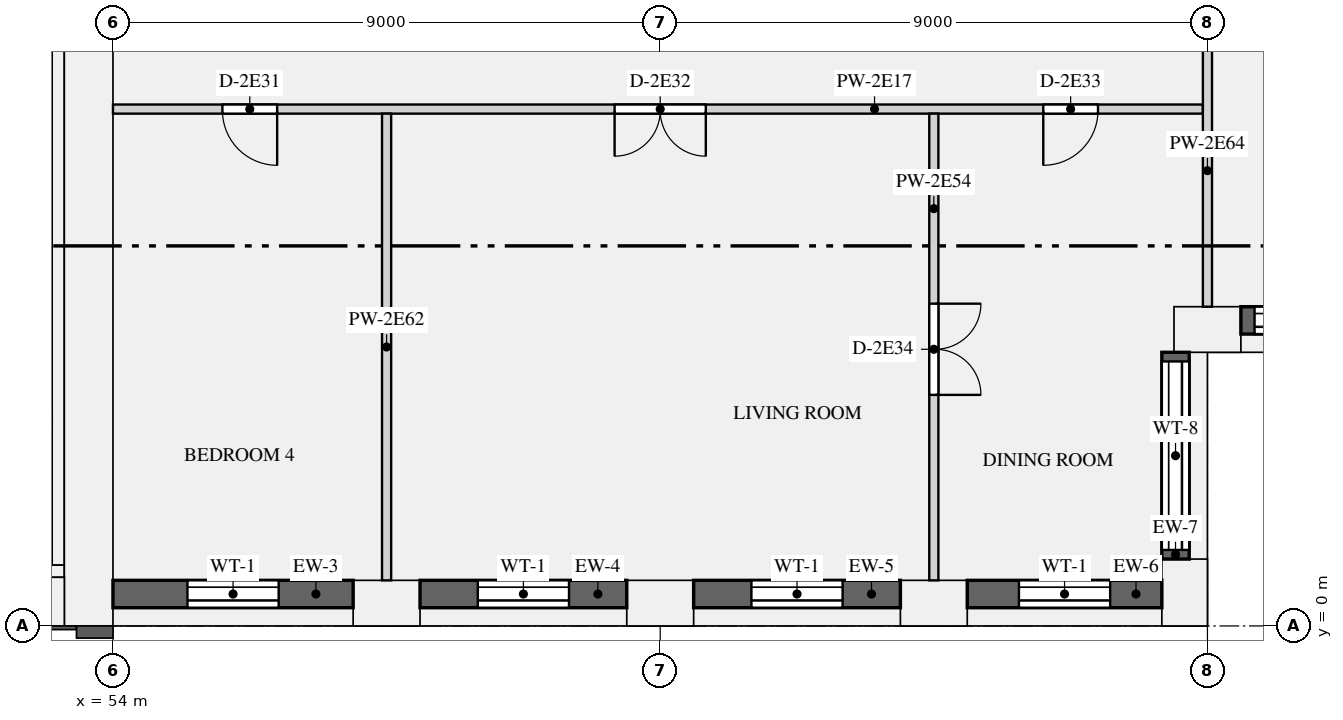
"""IFC4 building model, lengths in metres.
Left out: names, types, materials, properties, quantities, classifications, styles, units other than length and angle.
Written with IfcOpenShell. Run it as: python <this file> out.ifc"""

import sys

from ifc_helpers import new_model, si_unit, direction, frame, frame_2d, origin, origin_2d, place, context, subcontext, project, spatial, rectangle, extrude, element, fill, save


model = new_model("IFC4")
c1 = context("Model", 3, precision=1e-05, world=origin(), true_north=direction((0.0, 1.0)))
c2 = subcontext(c1, "Body", "Model", "MODEL_VIEW")
j1 = project(units=[si_unit("LENGTHUNIT", "METRE"), si_unit("PLANEANGLEUNIT", "RADIAN")], contexts=[c1])
p1 = place(None, origin())
s1 = spatial("IfcSite", under=j1, at=p1, CompositionType="ELEMENT")
p2 = place(p1, origin())
s2 = spatial("IfcBuilding", under=s1, at=p2, CompositionType="ELEMENT")
p3 = place(p2, frame((0.0, 0.0, 118.2)))
s3 = spatial("IfcBuildingStorey", under=s2, at=p3, CompositionType="ELEMENT", Elevation=118.2)
for number, where, z_axis, x_axis in (
    (1, (58.5, 0.375, 0.0), (0.0, 0.0, 1.0), (1.0, 0.0, 0.0)),
    (2, (63.0, 0.375, 0.0), (0.0, 0.0, 1.0), (1.0, 0.0, 0.0)),
    (3, (67.5, 0.375, 0.0), (0.0, 0.0, 1.0), (1.0, 0.0, 0.0)),
    (4, (71.625, 0.55, 0.0), (0.0, 0.0, 1.0), (0.0, 1.0, 0.0)),
    (5, (72.0, 4.875, 0.0), (0.0, 0.0, 1.0), (1.0, 0.0, 0.0)),
):
    element("IfcColumn", number, at=place(p3, frame(where, z_axis=z_axis, x_axis=x_axis)), inside=s3, PredefinedType="USERDEFINED", context=c2, shape_type="SweptSolid", body=[
        extrude(rectangle(XDim=1.1, YDim=0.75, at=origin_2d()), origin(), (0.0, 0.0, 1.0), 3.15),
    ])
p4 = place(p3, frame((53.6, 0.0, 0.0), z_axis=(0.0, 0.0, 1.0), x_axis=(0.0, 1.0, 0.0)))
e6 = element("IfcWall", 6, at=p4, inside=s3, PredefinedType="SHEAR", context=c2, shape_type="SweptSolid", body=[
    extrude(rectangle(XDim=12.5, YDim=0.8, at=frame_2d((6.25, 0.0))), origin(), (0.0, 0.0, 1.0), 3.15),
])
p5 = place(p3, frame((18.8, 0.4, 0.0), z_axis=(0.0, 0.0, 1.0), x_axis=(1.0, 0.0, 0.0)))
e7 = element("IfcWall", 7, at=p5, inside=s3, PredefinedType="SHEAR", context=c2, shape_type="SweptSolid", body=[
    extrude(rectangle(XDim=34.4, YDim=0.8, at=frame_2d((17.2, 0.0))), origin(), (0.0, 0.0, 1.0), 3.15),
])
p6 = place(p3, frame((53.1, 1.0, 0.0), z_axis=(0.0, 0.0, 1.0), x_axis=(0.0, 1.0, 0.0)))
e8 = element("IfcWall", 8, at=p6, inside=s3, PredefinedType="SHEAR", context=c2, shape_type="SweptSolid", body=[
    extrude(rectangle(XDim=10.9, YDim=0.2, at=frame_2d((5.45, 0.0))), origin(), (0.0, 0.0, 1.0), 3.15),
])
p7 = place(p3, frame((18.8, 0.9, 0.0), z_axis=(0.0, 0.0, 1.0), x_axis=(1.0, 0.0, 0.0)))
e9 = element("IfcWall", 9, at=p7, inside=s3, PredefinedType="SHEAR", context=c2, shape_type="SweptSolid", body=[
    extrude(rectangle(XDim=34.4, YDim=0.2, at=frame_2d((17.2, 0.0))), origin(), (0.0, 0.0, 1.0), 3.15),
])
p8 = place(p3, frame((54.0, 0.525, 0.9), z_axis=(0.0, 0.0, 1.0), x_axis=(1.0, 0.0, 0.0)))
e10 = element("IfcWall", 10, at=p8, inside=s3, PredefinedType="SOLIDWALL", context=c2, shape_type="SweptSolid", body=[
    extrude(rectangle(XDim=3.95, YDim=0.45, at=frame_2d((1.975, 0.0))), origin(), (0.0, 0.0, 1.0), 1.93),
])
p9 = place(p8, frame((1.225, 0.0, 0.15)))
e11 = element("IfcOpeningElement", 11, at=p9, cuts=e10, PredefinedType="OPENING", context=c2, shape_type="SweptSolid", body=[
    extrude(rectangle(XDim=1.5, YDim=1.5, at=frame_2d((0.75, 0.75))), frame((0.0, 0.235, 0.0), z_axis=(0.0, -1.0, 0.0), x_axis=(1.0, 0.0, 0.0)), (0.0, 0.0, 1.0), 0.47),
])
p10 = place(p3, frame((59.05, 0.525, 0.9), z_axis=(0.0, 0.0, 1.0), x_axis=(1.0, 0.0, 0.0)))
e12 = element("IfcWall", 12, at=p10, inside=s3, PredefinedType="SOLIDWALL", context=c2, shape_type="SweptSolid", body=[
    extrude(rectangle(XDim=3.4, YDim=0.45, at=frame_2d((1.7, 0.0))), origin(), (0.0, 0.0, 1.0), 1.93),
])
p11 = place(p10, frame((0.95, 0.0, 0.15)))
e13 = element("IfcOpeningElement", 13, at=p11, cuts=e12, PredefinedType="OPENING", context=c2, shape_type="SweptSolid", body=[
    extrude(rectangle(XDim=1.5, YDim=1.5, at=frame_2d((0.75, 0.75))), frame((0.0, 0.235, 0.0), z_axis=(0.0, -1.0, 0.0), x_axis=(1.0, 0.0, 0.0)), (0.0, 0.0, 1.0), 0.47),
])
p12 = place(p3, frame((63.55, 0.525, 0.9), z_axis=(0.0, 0.0, 1.0), x_axis=(1.0, 0.0, 0.0)))
e14 = element("IfcWall", 14, at=p12, inside=s3, PredefinedType="SOLIDWALL", context=c2, shape_type="SweptSolid", body=[
    extrude(rectangle(XDim=3.4, YDim=0.45, at=frame_2d((1.7, 0.0))), origin(), (0.0, 0.0, 1.0), 1.93),
])
p13 = place(p12, frame((0.95, 0.0, 0.15)))
e15 = element("IfcOpeningElement", 15, at=p13, cuts=e14, PredefinedType="OPENING", context=c2, shape_type="SweptSolid", body=[
    extrude(rectangle(XDim=1.5, YDim=1.5, at=frame_2d((0.75, 0.75))), frame((0.0, 0.235, 0.0), z_axis=(0.0, -1.0, 0.0), x_axis=(1.0, 0.0, 0.0)), (0.0, 0.0, 1.0), 0.47),
])
p14 = place(p3, frame((68.05, 0.525, 0.9), z_axis=(0.0, 0.0, 1.0), x_axis=(1.0, 0.0, 0.0)))
e16 = element("IfcWall", 16, at=p14, inside=s3, PredefinedType="SOLIDWALL", context=c2, shape_type="SweptSolid", body=[
    extrude(rectangle(XDim=3.2, YDim=0.45, at=frame_2d((1.6, 0.0))), origin(), (0.0, 0.0, 1.0), 1.93),
])
p15 = place(p14, frame((0.85, 0.0, 0.15)))
e17 = element("IfcOpeningElement", 17, at=p15, cuts=e16, PredefinedType="OPENING", context=c2, shape_type="SweptSolid", body=[
    extrude(rectangle(XDim=1.5, YDim=1.5, at=frame_2d((0.75, 0.75))), frame((0.0, 0.235, 0.0), z_axis=(0.0, -1.0, 0.0), x_axis=(1.0, 0.0, 0.0)), (0.0, 0.0, 1.0), 0.47),
])
p16 = place(p3, frame((71.475, 1.1, 0.9), z_axis=(0.0, 0.0, 1.0), x_axis=(0.0, 1.0, 0.0)))
e18 = element("IfcWall", 18, at=p16, inside=s3, PredefinedType="SOLIDWALL", context=c2, shape_type="SweptSolid", body=[
    extrude(rectangle(XDim=3.4, YDim=0.45, at=frame_2d((1.7, 0.0))), origin(), (0.0, 0.0, 1.0), 1.93),
])
p17 = place(p16, frame((0.15, 0.0, 0.15)))
e19 = element("IfcOpeningElement", 19, at=p17, cuts=e18, PredefinedType="OPENING", context=c2, shape_type="SweptSolid", body=[
    extrude(rectangle(XDim=3.1, YDim=1.5, at=frame_2d((1.55, 0.75))), frame((0.0, 0.235, 0.0), z_axis=(0.0, -1.0, 0.0), x_axis=(1.0, 0.0, 0.0)), (0.0, 0.0, 1.0), 0.47),
])
p18 = place(p3, frame((72.55, 5.025, 0.9), z_axis=(0.0, 0.0, 1.0), x_axis=(1.0, 0.0, 0.0)))
e20 = element("IfcWall", 20, at=p18, inside=s3, PredefinedType="SOLIDWALL", context=c2, shape_type="SweptSolid", body=[
    extrude(rectangle(XDim=3.2, YDim=0.45, at=frame_2d((1.6, 0.0))), origin(), (0.0, 0.0, 1.0), 1.93),
])
p19 = place(p18, frame((0.225, 0.0, 0.15)))
e21 = element("IfcOpeningElement", 21, at=p19, cuts=e20, PredefinedType="OPENING", context=c2, shape_type="SweptSolid", body=[
    extrude(rectangle(XDim=2.75, YDim=1.5, at=frame_2d((1.375, 0.75))), frame((0.0, 0.235, 0.0), z_axis=(0.0, -1.0, 0.0), x_axis=(1.0, 0.0, 0.0)), (0.0, 0.0, 1.0), 0.47),
])
p20 = place(p3, frame((54.0, 8.5, 0.0), z_axis=(0.0, 0.0, 1.0), x_axis=(1.0, 0.0, 0.0)))
e22 = element("IfcWall", 22, at=p20, inside=s3, PredefinedType="PARTITIONING", context=c2, shape_type="SweptSolid", body=[
    extrude(rectangle(XDim=17.925, YDim=0.15, at=frame_2d((8.962, 0.0))), origin(), (0.0, 0.0, 1.0), 2.83),
])
p21 = place(p20, frame((1.8, 0.0, 0.0)))
e23 = element("IfcOpeningElement", 23, at=p21, cuts=e22, PredefinedType="OPENING", context=c2, shape_type="SweptSolid", body=[
    extrude(rectangle(XDim=0.9, YDim=2.1, at=frame_2d((0.45, 1.05))), frame((0.0, 0.085, 0.0), z_axis=(0.0, -1.0, 0.0), x_axis=(1.0, 0.0, 0.0)), (0.0, 0.0, 1.0), 0.17),
])
p22 = place(p20, frame((8.25, 0.0, 0.0)))
e24 = element("IfcOpeningElement", 24, at=p22, cuts=e22, PredefinedType="OPENING", context=c2, shape_type="SweptSolid", body=[
    extrude(rectangle(XDim=1.5, YDim=2.1, at=frame_2d((0.75, 1.05))), frame((0.0, 0.085, 0.0), z_axis=(0.0, -1.0, 0.0), x_axis=(1.0, 0.0, 0.0)), (0.0, 0.0, 1.0), 0.17),
])
p23 = place(p20, frame((15.3, 0.0, 0.0)))
e25 = element("IfcOpeningElement", 25, at=p23, cuts=e22, PredefinedType="OPENING", context=c2, shape_type="SweptSolid", body=[
    extrude(rectangle(XDim=0.9, YDim=2.1, at=frame_2d((0.45, 1.05))), frame((0.0, 0.085, 0.0), z_axis=(0.0, -1.0, 0.0), x_axis=(1.0, 0.0, 0.0)), (0.0, 0.0, 1.0), 0.17),
])
p24 = place(p3, frame((67.5, 0.75, 0.0), z_axis=(0.0, 0.0, 1.0), x_axis=(0.0, 1.0, 0.0)))
e26 = element("IfcWall", 26, at=p24, inside=s3, PredefinedType="PARTITIONING", context=c2, shape_type="SweptSolid", body=[
    extrude(rectangle(XDim=7.675, YDim=0.15, at=frame_2d((3.837, 0.0))), origin(), (0.0, 0.0, 1.0), 2.83),
])
p25 = place(p24, frame((3.05, 0.0, 0.0)))
e27 = element("IfcOpeningElement", 27, at=p25, cuts=e26, PredefinedType="OPENING", context=c2, shape_type="SweptSolid", body=[
    extrude(rectangle(XDim=1.5, YDim=2.1, at=frame_2d((0.75, 1.05))), frame((0.0, 0.085, 0.0), z_axis=(0.0, -1.0, 0.0), x_axis=(1.0, 0.0, 0.0)), (0.0, 0.0, 1.0), 0.17),
])
p26 = place(p3, frame((58.5, 0.75, 0.0), z_axis=(0.0, 0.0, 1.0), x_axis=(0.0, 1.0, 0.0)))
e28 = element("IfcWall", 28, at=p26, inside=s3, PredefinedType="PARTITIONING", context=c2, shape_type="SweptSolid", body=[
    extrude(rectangle(XDim=7.675, YDim=0.15, at=frame_2d((3.837, 0.0))), origin(), (0.0, 0.0, 1.0), 2.83),
])
p27 = place(p3, frame((72.0, 5.25, 0.0), z_axis=(0.0, 0.0, 1.0), x_axis=(0.0, 1.0, 0.0)))
e29 = element("IfcWall", 29, at=p27, inside=s3, PredefinedType="PARTITIONING", context=c2, shape_type="SweptSolid", body=[
    extrude(rectangle(XDim=11.175, YDim=0.15, at=frame_2d((5.587, 0.0))), origin(), (0.0, 0.0, 1.0), 2.83),
])
p28 = place(p27, frame((4.475, 0.0, 0.0)))
e30 = element("IfcOpeningElement", 30, at=p28, cuts=e29, PredefinedType="OPENING", context=c2, shape_type="SweptSolid", body=[
    extrude(rectangle(XDim=0.9, YDim=2.1, at=frame_2d((0.45, 1.05))), frame((0.0, 0.085, 0.0), z_axis=(0.0, -1.0, 0.0), x_axis=(1.0, 0.0, 0.0)), (0.0, 0.0, 1.0), 0.17),
])
p29 = place(p27, frame((9.125, 0.0, 0.0)))
e31 = element("IfcOpeningElement", 31, at=p29, cuts=e29, PredefinedType="OPENING", context=c2, shape_type="SweptSolid", body=[
    extrude(rectangle(XDim=0.9, YDim=2.1, at=frame_2d((0.45, 1.05))), frame((0.0, 0.085, 0.0), z_axis=(0.0, -1.0, 0.0), x_axis=(1.0, 0.0, 0.0)), (0.0, 0.0, 1.0), 0.17),
])
p30 = place(p9, origin())
e32 = element("IfcWindow", 32, at=p30, inside=s3, PartitioningType="SINGLE_PANEL", PredefinedType="WINDOW", context=c2, shape_type="SweptSolid", body=[
    extrude(rectangle(XDim=1.5, YDim=1.5, at=frame_2d((0.75, 0.75))), frame((0.0, -0.065, 0.0), z_axis=(0.0, -1.0, 0.0), x_axis=(1.0, 0.0, 0.0)), (0.0, 0.0, 1.0), 0.06),
])
fill(e11, e32)
p31 = place(p11, origin())
e33 = element("IfcWindow", 33, at=p31, inside=s3, PartitioningType="SINGLE_PANEL", PredefinedType="WINDOW", context=c2, shape_type="SweptSolid", body=[
    extrude(rectangle(XDim=1.5, YDim=1.5, at=frame_2d((0.75, 0.75))), frame((0.0, -0.065, 0.0), z_axis=(0.0, -1.0, 0.0), x_axis=(1.0, 0.0, 0.0)), (0.0, 0.0, 1.0), 0.06),
])
fill(e13, e33)
p32 = place(p13, origin())
e34 = element("IfcWindow", 34, at=p32, inside=s3, PartitioningType="SINGLE_PANEL", PredefinedType="WINDOW", context=c2, shape_type="SweptSolid", body=[
    extrude(rectangle(XDim=1.5, YDim=1.5, at=frame_2d((0.75, 0.75))), frame((0.0, -0.065, 0.0), z_axis=(0.0, -1.0, 0.0), x_axis=(1.0, 0.0, 0.0)), (0.0, 0.0, 1.0), 0.06),
])
fill(e15, e34)
p33 = place(p15, origin())
e35 = element("IfcWindow", 35, at=p33, inside=s3, PartitioningType="SINGLE_PANEL", PredefinedType="WINDOW", context=c2, shape_type="SweptSolid", body=[
    extrude(rectangle(XDim=1.5, YDim=1.5, at=frame_2d((0.75, 0.75))), frame((0.0, -0.065, 0.0), z_axis=(0.0, -1.0, 0.0), x_axis=(1.0, 0.0, 0.0)), (0.0, 0.0, 1.0), 0.06),
])
fill(e17, e35)
p34 = place(p17, origin())
e36 = element("IfcWindow", 36, at=p34, inside=s3, PartitioningType="SINGLE_PANEL", PredefinedType="WINDOW", context=c2, shape_type="SweptSolid", body=[
    extrude(rectangle(XDim=3.1, YDim=1.5, at=frame_2d((1.55, 0.75))), frame((0.0, -0.065, 0.0), z_axis=(0.0, -1.0, 0.0), x_axis=(1.0, 0.0, 0.0)), (0.0, 0.0, 1.0), 0.06),
])
fill(e19, e36)
p35 = place(p19, origin())
e37 = element("IfcWindow", 37, at=p35, inside=s3, PartitioningType="SINGLE_PANEL", PredefinedType="WINDOW", context=c2, shape_type="SweptSolid", body=[
    extrude(rectangle(XDim=2.75, YDim=1.5, at=frame_2d((1.375, 0.75))), frame((0.0, -0.065, 0.0), z_axis=(0.0, -1.0, 0.0), x_axis=(1.0, 0.0, 0.0)), (0.0, 0.0, 1.0), 0.06),
])
fill(e21, e37)
p36 = place(p21, frame((0.9, 0.0, 0.0), z_axis=(0.0, 0.0, 1.0), x_axis=(-1.0, 0.0, 0.0)))
e38 = element("IfcDoor", 38, at=p36, inside=s3, OperationType="SINGLE_SWING_LEFT", PredefinedType="DOOR", context=c2, shape_type="SweptSolid", body=[
    extrude(rectangle(XDim=0.9, YDim=2.1, at=frame_2d((0.45, 1.05))), frame((0.0, 0.025, 0.0), z_axis=(0.0, -1.0, 0.0), x_axis=(1.0, 0.0, 0.0)), (0.0, 0.0, 1.0), 0.05),
])
fill(e23, e38)
p37 = place(p22, frame((1.5, 0.0, 0.0), z_axis=(0.0, 0.0, 1.0), x_axis=(-1.0, 0.0, 0.0)))
e39 = element("IfcDoor", 39, at=p37, inside=s3, OperationType="DOUBLE_DOOR_SINGLE_SWING", PredefinedType="DOOR", context=c2, shape_type="SweptSolid", body=[
    extrude(rectangle(XDim=1.5, YDim=2.1, at=frame_2d((0.75, 1.05))), frame((0.0, 0.025, 0.0), z_axis=(0.0, -1.0, 0.0), x_axis=(1.0, 0.0, 0.0)), (0.0, 0.0, 1.0), 0.05),
])
fill(e24, e39)
p38 = place(p23, frame((0.9, 0.0, 0.0), z_axis=(0.0, 0.0, 1.0), x_axis=(-1.0, 0.0, 0.0)))
e40 = element("IfcDoor", 40, at=p38, inside=s3, OperationType="SINGLE_SWING_RIGHT", PredefinedType="DOOR", context=c2, shape_type="SweptSolid", body=[
    extrude(rectangle(XDim=0.9, YDim=2.1, at=frame_2d((0.45, 1.05))), frame((0.0, 0.025, 0.0), z_axis=(0.0, -1.0, 0.0), x_axis=(1.0, 0.0, 0.0)), (0.0, 0.0, 1.0), 0.05),
])
fill(e25, e40)
p39 = place(p25, frame((1.5, 0.0, 0.0), z_axis=(0.0, 0.0, 1.0), x_axis=(-1.0, 0.0, 0.0)))
e41 = element("IfcDoor", 41, at=p39, inside=s3, OperationType="DOUBLE_DOOR_SINGLE_SWING", PredefinedType="DOOR", context=c2, shape_type="SweptSolid", body=[
    extrude(rectangle(XDim=1.5, YDim=2.1, at=frame_2d((0.75, 1.05))), frame((0.0, 0.025, 0.0), z_axis=(0.0, -1.0, 0.0), x_axis=(1.0, 0.0, 0.0)), (0.0, 0.0, 1.0), 0.05),
])
fill(e27, e41)
save(model, sys.argv[1])
